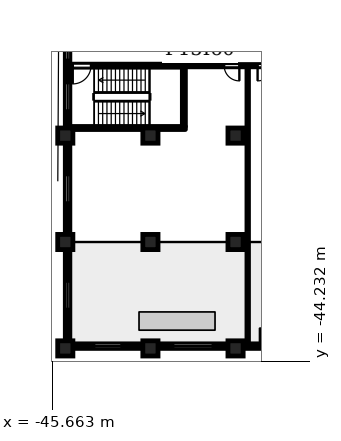
"""IFC4 building model, lengths in metres.
Left out: names, types, materials, properties, quantities, classifications, styles, units other than length and angle.
Written with IfcOpenShell. Run it as: python <this file> out.ifc"""

import sys

from ifc_helpers import new_model, si_unit, direction, frame, frame_2d, origin, origin_2d, place, context, subcontext, project, spatial, rectangle, circle, extrude, element, fill, save


model = new_model("IFC4")
c1 = context("Model", 3, precision=1e-05, world=origin(), true_north=direction((0.0, 1.0)))
c2 = subcontext(c1, "Body", "Model", "MODEL_VIEW")
j1 = project(units=[si_unit("LENGTHUNIT", "METRE"), si_unit("PLANEANGLEUNIT", "RADIAN")], contexts=[c1])
p1 = place(None, origin())
s1 = spatial("IfcSite", under=j1, at=p1, CompositionType="ELEMENT")
p2 = place(p1, origin())
s2 = spatial("IfcBuilding", under=s1, at=p2, CompositionType="ELEMENT")
p3 = place(p2, frame((0.0, 0.0, 16.1)))
s3 = spatial("IfcBuildingStorey", under=s2, at=p3, CompositionType="ELEMENT", Elevation=16.1)
for number, where, z_axis, x_axis in (
    (1, (-44.8, -29.4, 0.0), (0.0, 0.0, 1.0), (1.0, 0.0, 0.0)),
    (2, (-39.2, -29.4, 0.0), (0.0, 0.0, 1.0), (1.0, 0.0, 0.0)),
    (3, (-33.6, -29.4, 0.0), (0.0, 0.0, 1.0), (1.0, 0.0, 0.0)),
    (4, (-44.8, -36.4, 0.0), (0.0, 0.0, 1.0), (1.0, 0.0, 0.0)),
    (5, (-39.2, -36.4, 0.0), (0.0, 0.0, 1.0), (1.0, 0.0, 0.0)),
    (6, (-33.6, -36.4, 0.0), (0.0, 0.0, 1.0), (1.0, 0.0, 0.0)),
    (7, (-44.8, -43.4, 0.0), (0.0, 0.0, 1.0), (1.0, 0.0, 0.0)),
    (8, (-39.2, -43.4, 0.0), (0.0, 0.0, 1.0), (1.0, 0.0, 0.0)),
    (9, (-33.6, -43.4, 0.0), (0.0, 0.0, 1.0), (1.0, 0.0, 0.0)),
):
    element("IfcColumn", number, at=place(p3, frame(where, z_axis=z_axis, x_axis=x_axis)), inside=s3, PredefinedType="COLUMN", context=c2, shape_type="SweptSolid", body=[
        extrude(circle(Radius=0.5, at=origin_2d()), origin(), (0.0, 0.0, 1.0), 4.8),
    ])
p4 = place(p3, frame((-44.65, -22.9, 0.0), z_axis=(0.0, 0.0, 1.0), x_axis=(0.0, -1.0, 0.0)))
e10 = element("IfcWall", 10, at=p4, inside=s3, PredefinedType="SOLIDWALL", context=c2, shape_type="SweptSolid", body=[
    extrude(rectangle(XDim=6.0, YDim=0.3, at=frame_2d((3.0, 0.0))), origin(), (0.0, 0.0, 1.0), 3.65),
])
p5 = place(p4, frame((0.312, 0.0, 0.6)))
e11 = element("IfcOpeningElement", 11, at=p5, cuts=e10, PredefinedType="OPENING", context=c2, shape_type="SweptSolid", body=[
    extrude(rectangle(XDim=1.2, YDim=1.55, at=frame_2d((0.6, 0.775))), frame((0.0, 0.16, 0.0), z_axis=(0.0, -1.0, 0.0), x_axis=(1.0, 0.0, 0.0)), (0.0, 0.0, 1.0), 0.32),
])
p6 = place(p4, frame((3.05, 0.0, 0.9)))
e12 = element("IfcOpeningElement", 12, at=p6, cuts=e10, PredefinedType="OPENING", context=c2, shape_type="SweptSolid", body=[
    extrude(rectangle(XDim=1.8, YDim=1.25, at=frame_2d((0.9, 0.625))), frame((0.0, 0.16, 0.0), z_axis=(0.0, -1.0, 0.0), x_axis=(1.0, 0.0, 0.0)), (0.0, 0.0, 1.0), 0.32),
])
p7 = place(p3, frame((-44.65, -29.9, 0.0), z_axis=(0.0, 0.0, 1.0), x_axis=(0.0, -1.0, 0.0)))
e13 = element("IfcWall", 13, at=p7, inside=s3, PredefinedType="SOLIDWALL", context=c2, shape_type="SweptSolid", body=[
    extrude(rectangle(XDim=6.0, YDim=0.3, at=frame_2d((3.0, 0.0))), origin(), (0.0, 0.0, 1.0), 3.65),
])
p8 = place(p7, frame((2.1, 0.0, 0.9)))
e14 = element("IfcOpeningElement", 14, at=p8, cuts=e13, PredefinedType="OPENING", context=c2, shape_type="SweptSolid", body=[
    extrude(rectangle(XDim=1.8, YDim=1.25, at=frame_2d((0.9, 0.625))), frame((0.0, 0.16, 0.0), z_axis=(0.0, -1.0, 0.0), x_axis=(1.0, 0.0, 0.0)), (0.0, 0.0, 1.0), 0.32),
])
p9 = place(p3, frame((-44.65, -36.9, 0.0), z_axis=(0.0, 0.0, 1.0), x_axis=(0.0, -1.0, 0.0)))
e15 = element("IfcWall", 15, at=p9, inside=s3, PredefinedType="SOLIDWALL", context=c2, shape_type="SweptSolid", body=[
    extrude(rectangle(XDim=6.0, YDim=0.3, at=frame_2d((3.0, 0.0))), origin(), (0.0, 0.0, 1.0), 3.65),
])
p10 = place(p9, frame((2.1, 0.0, 0.9)))
e16 = element("IfcOpeningElement", 16, at=p10, cuts=e15, PredefinedType="OPENING", context=c2, shape_type="SweptSolid", body=[
    extrude(rectangle(XDim=1.8, YDim=1.25, at=frame_2d((0.9, 0.625))), frame((0.0, 0.16, 0.0), z_axis=(0.0, -1.0, 0.0), x_axis=(1.0, 0.0, 0.0)), (0.0, 0.0, 1.0), 0.32),
])
p11 = place(p3, frame((-44.3, -43.25, 0.0), z_axis=(0.0, 0.0, 1.0), x_axis=(1.0, 0.0, 0.0)))
e17 = element("IfcWall", 17, at=p11, inside=s3, PredefinedType="SOLIDWALL", context=c2, shape_type="SweptSolid", body=[
    extrude(rectangle(XDim=4.6, YDim=0.3, at=frame_2d((2.3, 0.0))), origin(), (0.0, 0.0, 1.0), 3.65),
])
p12 = place(p11, frame((1.4, 0.0, 0.9)))
e18 = element("IfcOpeningElement", 18, at=p12, cuts=e17, PredefinedType="OPENING", context=c2, shape_type="SweptSolid", body=[
    extrude(rectangle(XDim=1.8, YDim=1.25, at=frame_2d((0.9, 0.625))), frame((0.0, 0.16, 0.0), z_axis=(0.0, -1.0, 0.0), x_axis=(1.0, 0.0, 0.0)), (0.0, 0.0, 1.0), 0.32),
])
p13 = place(p3, frame((-38.7, -43.25, 0.0), z_axis=(0.0, 0.0, 1.0), x_axis=(1.0, 0.0, 0.0)))
e19 = element("IfcWall", 19, at=p13, inside=s3, PredefinedType="SOLIDWALL", context=c2, shape_type="SweptSolid", body=[
    extrude(rectangle(XDim=4.6, YDim=0.3, at=frame_2d((2.3, 0.0))), origin(), (0.0, 0.0, 1.0), 3.65),
])
p14 = place(p13, frame((1.0, 0.0, 0.9)))
e20 = element("IfcOpeningElement", 20, at=p14, cuts=e19, PredefinedType="OPENING", context=c2, shape_type="SweptSolid", body=[
    extrude(rectangle(XDim=2.6, YDim=1.25, at=frame_2d((1.3, 0.625))), frame((0.0, 0.16, 0.0), z_axis=(0.0, -1.0, 0.0), x_axis=(1.0, 0.0, 0.0)), (0.0, 0.0, 1.0), 0.32),
])
p15 = place(p3, frame((-33.1, -43.25, 0.0), z_axis=(0.0, 0.0, 1.0), x_axis=(1.0, 0.0, 0.0)))
e21 = element("IfcWall", 21, at=p15, inside=s3, PredefinedType="SOLIDWALL", context=c2, shape_type="SweptSolid", body=[
    extrude(rectangle(XDim=4.6, YDim=0.3, at=frame_2d((2.3, 0.0))), origin(), (0.0, 0.0, 1.0), 3.65),
])
p16 = place(p15, frame((1.1, 0.0, 0.0)))
e22 = element("IfcOpeningElement", 22, at=p16, cuts=e21, PredefinedType="OPENING", context=c2, shape_type="SweptSolid", body=[
    extrude(rectangle(XDim=2.4, YDim=2.3, at=frame_2d((1.2, 1.15))), frame((0.0, 0.16, 0.0), z_axis=(0.0, -1.0, 0.0), x_axis=(1.0, 0.0, 0.0)), (0.0, 0.0, 1.0), 0.32),
])
p17 = place(p3, frame((-44.71, -28.9, 0.0), z_axis=(0.0, 0.0, 1.0), x_axis=(1.0, 0.0, 0.0)))
e23 = element("IfcWall", 23, at=p17, inside=s3, PredefinedType="SHEAR", context=c2, shape_type="SweptSolid", body=[
    extrude(rectangle(XDim=7.81, YDim=0.2, at=frame_2d((3.905, 0.0))), origin(), (0.0, 0.0, 1.0), 4.45),
])
p18 = place(p3, frame((-37.0, -24.8, 0.0), z_axis=(0.0, 0.0, 1.0), x_axis=(1.0, 0.0, 0.0)))
e24 = element("IfcWall", 24, at=p18, inside=s3, PredefinedType="PARTITIONING", context=c2, shape_type="SweptSolid", body=[
    extrude(rectangle(XDim=74.0, YDim=0.15, at=frame_2d((37.0, 0.0))), origin(), (0.0, 0.0, 1.0), 4.45),
])
p19 = place(p18, frame((2.65, 0.0, 0.0)))
e25 = element("IfcOpeningElement", 25, at=p19, cuts=e24, PredefinedType="OPENING", context=c2, shape_type="SweptSolid", body=[
    extrude(rectangle(XDim=1.0, YDim=2.1, at=frame_2d((0.5, 1.05))), frame((0.0, 0.085, 0.0), z_axis=(0.0, -1.0, 0.0), x_axis=(1.0, 0.0, 0.0)), (0.0, 0.0, 1.0), 0.17),
])
p20 = place(p18, frame((4.85, 0.0, 0.0)))
e26 = element("IfcOpeningElement", 26, at=p20, cuts=e24, PredefinedType="OPENING", context=c2, shape_type="SweptSolid", body=[
    extrude(rectangle(XDim=1.0, YDim=2.1, at=frame_2d((0.5, 1.05))), frame((0.0, 0.085, 0.0), z_axis=(0.0, -1.0, 0.0), x_axis=(1.0, 0.0, 0.0)), (0.0, 0.0, 1.0), 0.17),
])
p21 = place(p18, frame((35.35, 0.0, 0.0)))
e27 = element("IfcOpeningElement", 27, at=p21, cuts=e24, PredefinedType="OPENING", context=c2, shape_type="SweptSolid", body=[
    extrude(rectangle(XDim=1.0, YDim=2.1, at=frame_2d((0.5, 1.05))), frame((0.0, 0.085, 0.0), z_axis=(0.0, -1.0, 0.0), x_axis=(1.0, 0.0, 0.0)), (0.0, 0.0, 1.0), 0.17),
])
p22 = place(p18, frame((37.65, 0.0, 0.0)))
e28 = element("IfcOpeningElement", 28, at=p22, cuts=e24, PredefinedType="OPENING", context=c2, shape_type="SweptSolid", body=[
    extrude(rectangle(XDim=1.0, YDim=2.1, at=frame_2d((0.5, 1.05))), frame((0.0, 0.085, 0.0), z_axis=(0.0, -1.0, 0.0), x_axis=(1.0, 0.0, 0.0)), (0.0, 0.0, 1.0), 0.17),
])
p23 = place(p18, frame((55.4, 0.0, 0.0)))
e29 = element("IfcOpeningElement", 29, at=p23, cuts=e24, PredefinedType="OPENING", context=c2, shape_type="SweptSolid", body=[
    extrude(rectangle(XDim=1.0, YDim=2.1, at=frame_2d((0.5, 1.05))), frame((0.0, 0.085, 0.0), z_axis=(0.0, -1.0, 0.0), x_axis=(1.0, 0.0, 0.0)), (0.0, 0.0, 1.0), 0.17),
])
p24 = place(p18, frame((57.645, 0.0, 0.0)))
e30 = element("IfcOpeningElement", 30, at=p24, cuts=e24, PredefinedType="OPENING", context=c2, shape_type="SweptSolid", body=[
    extrude(rectangle(XDim=1.0, YDim=2.1, at=frame_2d((0.5, 1.05))), frame((0.0, 0.085, 0.0), z_axis=(0.0, -1.0, 0.0), x_axis=(1.0, 0.0, 0.0)), (0.0, 0.0, 1.0), 0.17),
])
p25 = place(p18, frame((72.4, 0.0, 0.0)))
e31 = element("IfcOpeningElement", 31, at=p25, cuts=e24, PredefinedType="OPENING", context=c2, shape_type="SweptSolid", body=[
    extrude(rectangle(XDim=1.0, YDim=2.1, at=frame_2d((0.5, 1.05))), frame((0.0, 0.085, 0.0), z_axis=(0.0, -1.0, 0.0), x_axis=(1.0, 0.0, 0.0)), (0.0, 0.0, 1.0), 0.17),
])
p26 = place(p3, frame((-44.71, -24.8, 0.0), z_axis=(0.0, 0.0, 1.0), x_axis=(1.0, 0.0, 0.0)))
e32 = element("IfcWall", 32, at=p26, inside=s3, PredefinedType="SHEAR", context=c2, shape_type="SweptSolid", body=[
    extrude(rectangle(XDim=7.71, YDim=0.2, at=frame_2d((3.855, 0.0))), origin(), (0.0, 0.0, 1.0), 4.45),
])
p27 = place(p26, frame((0.4, 0.0, 0.0)))
e33 = element("IfcOpeningElement", 33, at=p27, cuts=e32, PredefinedType="OPENING", context=c2, shape_type="SweptSolid", body=[
    extrude(rectangle(XDim=1.2, YDim=2.1, at=frame_2d((0.6, 1.05))), frame((0.0, 0.11, 0.0), z_axis=(0.0, -1.0, 0.0), x_axis=(1.0, 0.0, 0.0)), (0.0, 0.0, 1.0), 0.22),
])
p28 = place(p3, frame((-37.0, -28.8, 0.0), z_axis=(0.0, 0.0, 1.0), x_axis=(0.0, 1.0, 0.0)))
e34 = element("IfcWall", 34, at=p28, inside=s3, PredefinedType="SHEAR", context=c2, shape_type="SweptSolid", body=[
    extrude(rectangle(XDim=3.925, YDim=0.2, at=frame_2d((1.962, 0.0))), origin(), (0.0, 0.0, 1.0), 4.45),
])
p29 = place(p3, frame((-32.8, -43.08, 0.0), z_axis=(0.0, 0.0, 1.0), x_axis=(0.0, 1.0, 0.0)))
e35 = element("IfcWall", 35, at=p29, inside=s3, PredefinedType="PARTITIONING", context=c2, shape_type="SweptSolid", body=[
    extrude(rectangle(XDim=18.205, YDim=0.1, at=frame_2d((9.103, 0.0))), origin(), (0.0, 0.0, 1.0), 4.45),
])
p30 = place(p16, origin())
e36 = element("IfcDoor", 36, at=p30, inside=s3, OperationType="SINGLE_SWING_LEFT", PredefinedType="DOOR", context=c2, shape_type="SweptSolid", body=[
    extrude(rectangle(XDim=2.4, YDim=2.3, at=frame_2d((1.2, 1.15))), frame((0.0, 0.025, 0.0), z_axis=(0.0, -1.0, 0.0), x_axis=(1.0, 0.0, 0.0)), (0.0, 0.0, 1.0), 0.05),
])
fill(e22, e36)
p31 = place(p27, origin())
e37 = element("IfcDoor", 37, at=p31, inside=s3, OperationType="SINGLE_SWING_LEFT", PredefinedType="DOOR", context=c2, shape_type="SweptSolid", body=[
    extrude(rectangle(XDim=1.2, YDim=2.1, at=frame_2d((0.6, 1.05))), frame((0.0, 0.025, 0.0), z_axis=(0.0, -1.0, 0.0), x_axis=(1.0, 0.0, 0.0)), (0.0, 0.0, 1.0), 0.05),
])
fill(e33, e37)
p32 = place(p19, origin())
e38 = element("IfcDoor", 38, at=p32, inside=s3, OperationType="SINGLE_SWING_RIGHT", PredefinedType="DOOR", context=c2, shape_type="SweptSolid", body=[
    extrude(rectangle(XDim=1.0, YDim=2.1, at=frame_2d((0.5, 1.05))), frame((0.0, 0.025, 0.0), z_axis=(0.0, -1.0, 0.0), x_axis=(1.0, 0.0, 0.0)), (0.0, 0.0, 1.0), 0.05),
])
fill(e25, e38)
p33 = place(p20, origin())
e39 = element("IfcDoor", 39, at=p33, inside=s3, OperationType="SINGLE_SWING_LEFT", PredefinedType="DOOR", context=c2, shape_type="SweptSolid", body=[
    extrude(rectangle(XDim=1.0, YDim=2.1, at=frame_2d((0.5, 1.05))), frame((0.0, 0.025, 0.0), z_axis=(0.0, -1.0, 0.0), x_axis=(1.0, 0.0, 0.0)), (0.0, 0.0, 1.0), 0.05),
])
fill(e26, e39)
p34 = place(p5, origin())
e40 = element("IfcWindow", 40, at=p34, inside=s3, PartitioningType="SINGLE_PANEL", PredefinedType="WINDOW", context=c2, shape_type="SweptSolid", body=[
    extrude(rectangle(XDim=1.2, YDim=1.55, at=frame_2d((0.6, 0.775))), frame((0.0, 0.03, 0.0), z_axis=(0.0, -1.0, 0.0), x_axis=(1.0, 0.0, 0.0)), (0.0, 0.0, 1.0), 0.06),
])
fill(e11, e40)
p35 = place(p6, origin())
e41 = element("IfcWindow", 41, at=p35, inside=s3, PartitioningType="SINGLE_PANEL", PredefinedType="WINDOW", context=c2, shape_type="SweptSolid", body=[
    extrude(rectangle(XDim=1.8, YDim=1.25, at=frame_2d((0.9, 0.625))), frame((0.0, 0.03, 0.0), z_axis=(0.0, -1.0, 0.0), x_axis=(1.0, 0.0, 0.0)), (0.0, 0.0, 1.0), 0.06),
])
fill(e12, e41)
p36 = place(p8, origin())
e42 = element("IfcWindow", 42, at=p36, inside=s3, PartitioningType="SINGLE_PANEL", PredefinedType="WINDOW", context=c2, shape_type="SweptSolid", body=[
    extrude(rectangle(XDim=1.8, YDim=1.25, at=frame_2d((0.9, 0.625))), frame((0.0, 0.03, 0.0), z_axis=(0.0, -1.0, 0.0), x_axis=(1.0, 0.0, 0.0)), (0.0, 0.0, 1.0), 0.06),
])
fill(e14, e42)
p37 = place(p10, origin())
e43 = element("IfcWindow", 43, at=p37, inside=s3, PartitioningType="SINGLE_PANEL", PredefinedType="WINDOW", context=c2, shape_type="SweptSolid", body=[
    extrude(rectangle(XDim=1.8, YDim=1.25, at=frame_2d((0.9, 0.625))), frame((0.0, 0.03, 0.0), z_axis=(0.0, -1.0, 0.0), x_axis=(1.0, 0.0, 0.0)), (0.0, 0.0, 1.0), 0.06),
])
fill(e16, e43)
p38 = place(p12, origin())
e44 = element("IfcWindow", 44, at=p38, inside=s3, PartitioningType="SINGLE_PANEL", PredefinedType="WINDOW", context=c2, shape_type="SweptSolid", body=[
    extrude(rectangle(XDim=1.8, YDim=1.25, at=frame_2d((0.9, 0.625))), frame((0.0, 0.03, 0.0), z_axis=(0.0, -1.0, 0.0), x_axis=(1.0, 0.0, 0.0)), (0.0, 0.0, 1.0), 0.06),
])
fill(e18, e44)
p39 = place(p14, origin())
e45 = element("IfcWindow", 45, at=p39, inside=s3, PartitioningType="SINGLE_PANEL", PredefinedType="WINDOW", context=c2, shape_type="SweptSolid", body=[
    extrude(rectangle(XDim=2.6, YDim=1.25, at=frame_2d((1.3, 0.625))), frame((0.0, 0.03, 0.0), z_axis=(0.0, -1.0, 0.0), x_axis=(1.0, 0.0, 0.0)), (0.0, 0.0, 1.0), 0.06),
])
fill(e20, e45)
save(model, sys.argv[1])
